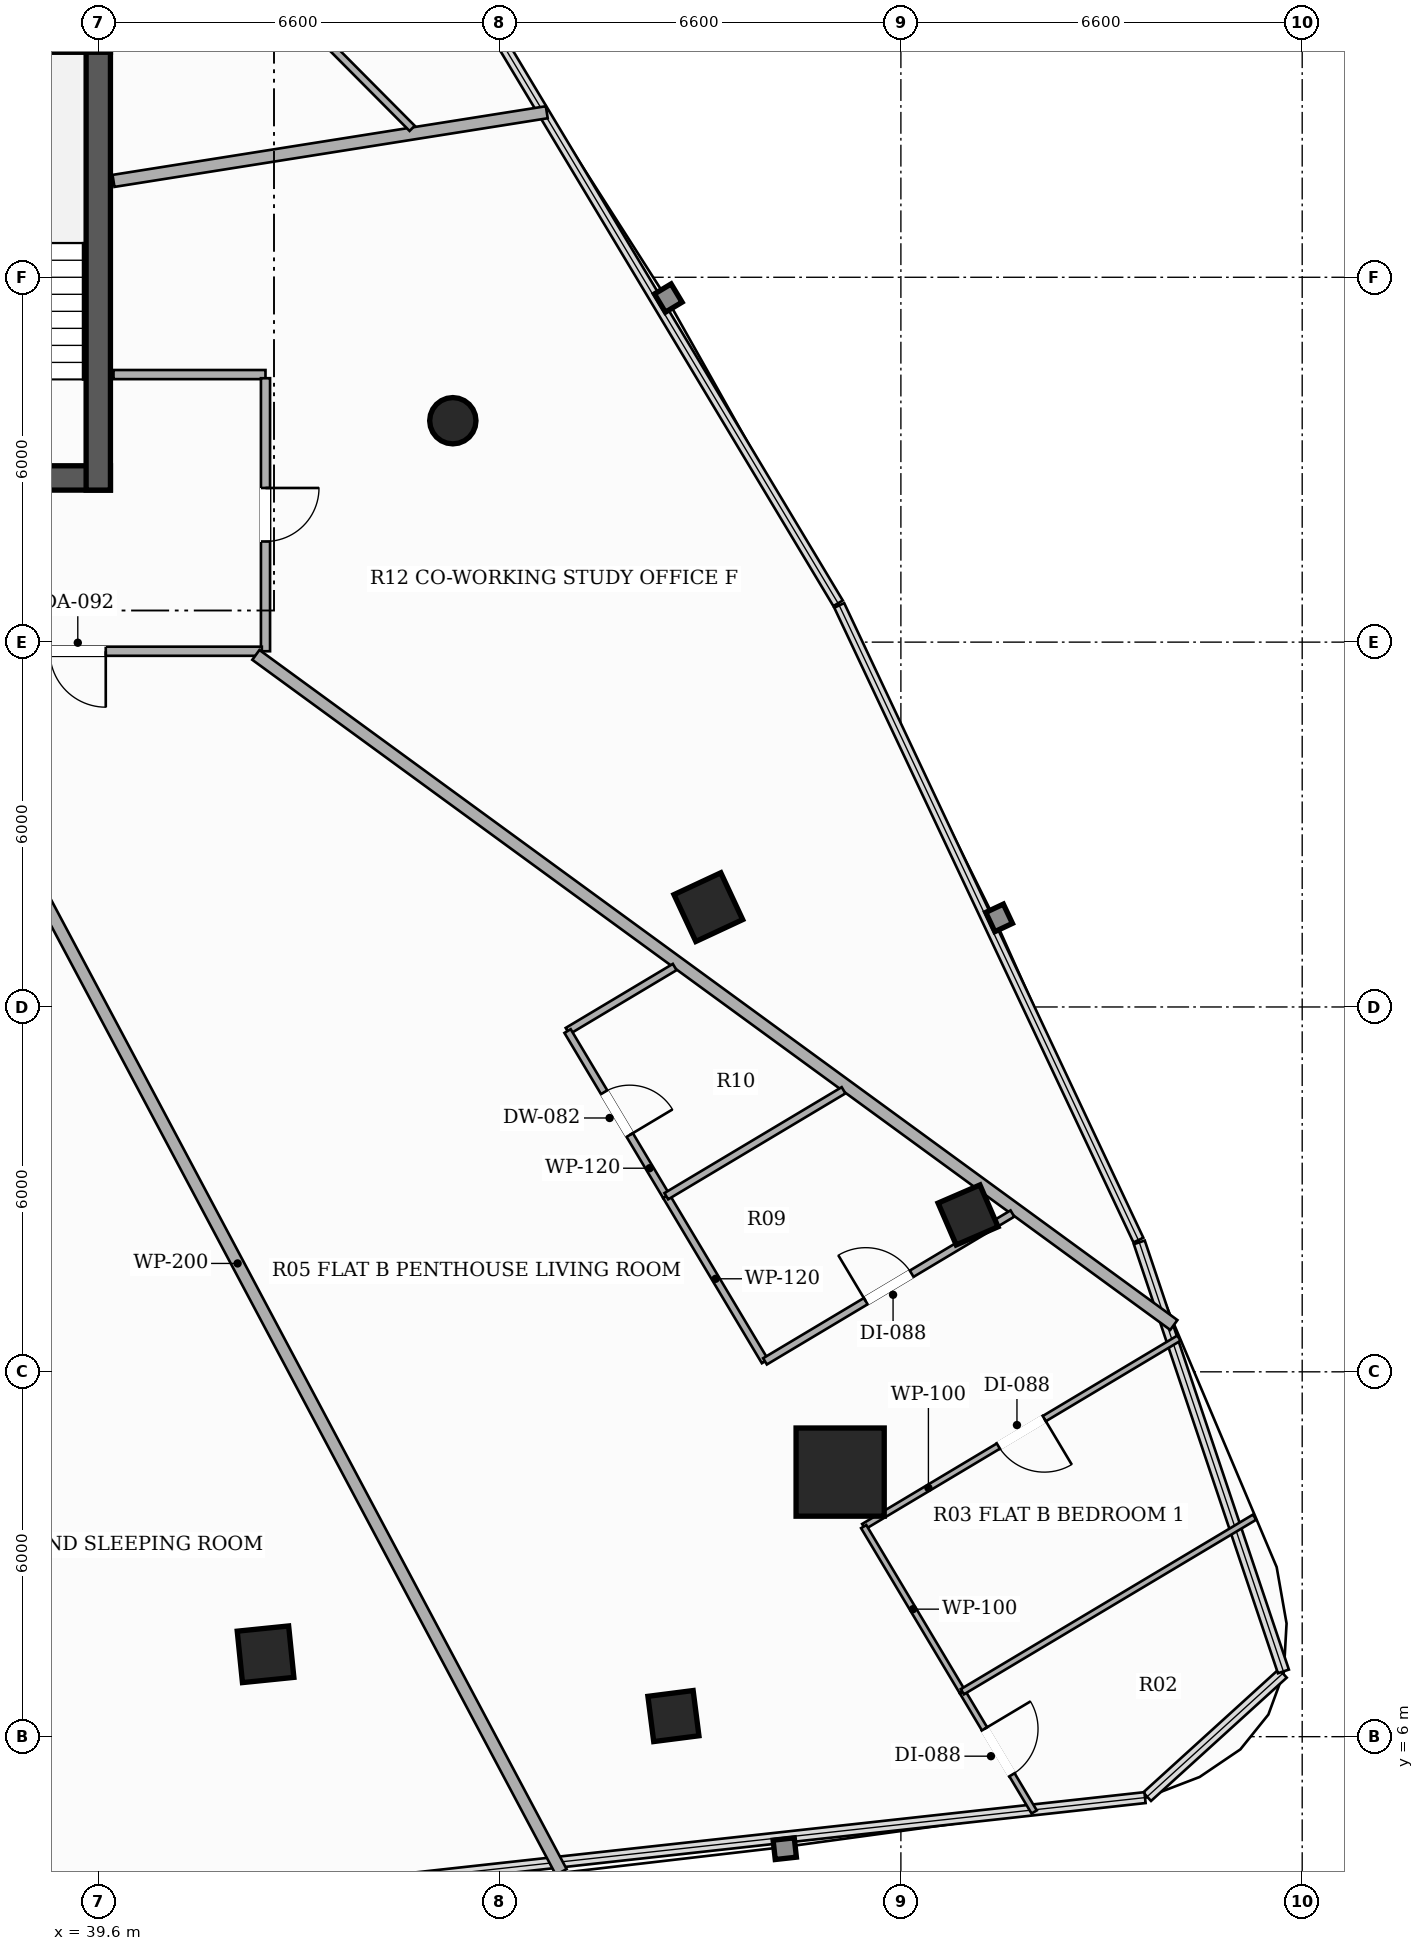
"""IFC4 building model, lengths in metres.
Left out: names, types, materials, properties, quantities, classifications, styles, units other than length and angle.
Written with IfcOpenShell. Run it as: python <this file> out.ifc"""

import sys

from ifc_helpers import new_model, si_unit, direction, frame, frame_2d, origin, origin_2d, place, context, subcontext, project, spatial, rectangle, hollow_rectangle, hollow_circle, extrude, element, fill, save


model = new_model("IFC4")
c1 = context("Model", 3, precision=1e-05, world=origin(), true_north=direction((0.0, 1.0)))
c2 = subcontext(c1, "Body", "Model", "MODEL_VIEW")
j1 = project(units=[si_unit("LENGTHUNIT", "METRE"), si_unit("PLANEANGLEUNIT", "RADIAN")], contexts=[c1])
p1 = place(None, origin())
s1 = spatial("IfcSite", under=j1, at=p1, CompositionType="ELEMENT")
p2 = place(p1, origin())
s2 = spatial("IfcBuilding", under=s1, at=p2, CompositionType="ELEMENT")
p3 = place(p2, frame((0.0, 0.0, 123.2)))
s3 = spatial("IfcBuildingStorey", under=s2, at=p3, CompositionType="ELEMENT", Elevation=123.2)
p4 = place(p3, frame((26.2, 26.7, 0.0), z_axis=(0.0, 0.0, 1.0), x_axis=(1.0, 0.0, 0.0)))
e1 = element("IfcWall", 1, at=p4, inside=s3, PredefinedType="SHEAR", context=c2, shape_type="SweptSolid", body=[
    extrude(rectangle(XDim=13.6, YDim=0.4, at=frame_2d((6.8, 0.0))), origin(), (0.0, 0.0, 1.0), 3.3),
])
p5 = place(p4, frame((4.35, 0.0, 0.0)))
e2 = element("IfcOpeningElement", 2, at=p5, cuts=e1, PredefinedType="OPENING", context=c2, shape_type="SweptSolid", body=[
    extrude(rectangle(XDim=1.05, YDim=2.15, at=frame_2d((0.525, 1.075))), frame((0.0, 0.21, 0.0), z_axis=(0.0, -1.0, 0.0), x_axis=(1.0, 0.0, 0.0)), (0.0, 0.0, 1.0), 0.42),
])
p6 = place(p4, frame((8.3, 0.0, 0.0)))
e3 = element("IfcOpeningElement", 3, at=p6, cuts=e1, PredefinedType="OPENING", context=c2, shape_type="SweptSolid", body=[
    extrude(rectangle(XDim=1.05, YDim=2.15, at=frame_2d((0.525, 1.075))), frame((0.0, 0.21, 0.0), z_axis=(0.0, -1.0, 0.0), x_axis=(1.0, 0.0, 0.0)), (0.0, 0.0, 1.0), 0.42),
])
p7 = place(p3, frame((39.6, 26.5, 0.0), z_axis=(0.0, 0.0, 1.0), x_axis=(0.0, 1.0, 0.0)))
e4 = element("IfcWall", 4, at=p7, inside=s3, PredefinedType="SHEAR", context=c2, shape_type="SweptSolid", body=[
    extrude(rectangle(XDim=7.6, YDim=0.4, at=frame_2d((3.8, 0.0))), origin(), (0.0, 0.0, 1.0), 3.3),
])
p8 = place(p3, frame((36.12, 33.9, 0.0), z_axis=(0.0, 0.0, 1.0), x_axis=(1.0, 0.0, 0.0)))
e5 = element("IfcWall", 5, at=p8, inside=s3, PredefinedType="SHEAR", context=c2, shape_type="SweptSolid", body=[
    extrude(rectangle(XDim=3.68, YDim=0.4, at=frame_2d((1.84, 0.0))), origin(), (0.0, 0.0, 1.0), 3.3),
])
p9 = place(p3, frame((51.801, 10.351, 0.0), z_axis=(0.0, 0.0, 1.0), x_axis=(1.0, 0.0, 0.0)))
e6 = element("IfcColumn", 6, at=p9, inside=s3, PredefinedType="COLUMN", context=c2, shape_type="SweptSolid", body=[
    extrude(hollow_rectangle(XDim=1.45, YDim=1.45, WallThickness=0.045, at=origin_2d()), origin(), (0.0, 0.0, 1.0), 3.3),
])
for number, where, z_axis, x_axis in (
    (7, (42.351, 7.355, 0.0), (0.0, 0.0, 1.0), (0.995, 0.101, 0.0)),
    (8, (49.633, 19.642, 0.0), (0.0, 0.0, 1.0), (-0.423, 0.906, 0.0)),
):
    element("IfcColumn", number, at=place(p3, frame(where, z_axis=z_axis, x_axis=x_axis)), inside=s3, PredefinedType="COLUMN", context=c2, shape_type="SweptSolid", body=[
        extrude(hollow_rectangle(XDim=0.85, YDim=0.85, WallThickness=0.028, at=origin_2d()), origin(), (0.0, 0.0, 1.0), 3.3),
    ])
p10 = place(p3, frame((45.431, 27.641, 0.0), z_axis=(0.0, 0.0, 1.0), x_axis=(1.0, 0.0, 0.0)))
e9 = element("IfcColumn", 9, at=p10, inside=s3, PredefinedType="COLUMN", context=c2, shape_type="SweptSolid", body=[
    extrude(hollow_circle(Radius=0.381, WallThickness=0.022, at=origin_2d()), origin(), (0.0, 0.0, 1.0), 3.3),
])
for number, where, z_axis, x_axis in (
    (10, (49.059, 6.339, 0.0), (0.0, 0.0, 1.0), (0.992, 0.127, 0.0)),
    (11, (53.905, 14.58, 0.0), (0.0, 0.0, 1.0), (-0.397, 0.918, 0.0)),
):
    element("IfcColumn", number, at=place(p3, frame(where, z_axis=z_axis, x_axis=x_axis)), inside=s3, PredefinedType="COLUMN", context=c2, shape_type="SweptSolid", body=[
        extrude(hollow_rectangle(XDim=0.75, YDim=0.75, WallThickness=0.025, at=origin_2d()), origin(), (0.0, 0.0, 1.0), 3.3),
    ])
p11 = place(p3, frame((39.85, 28.4, 0.0), z_axis=(0.0, 0.0, 1.0), x_axis=(1.0, 0.0, 0.0)))
e12 = element("IfcWall", 12, at=p11, inside=s3, PredefinedType="PARTITIONING", context=c2, shape_type="SweptSolid", body=[
    extrude(rectangle(XDim=2.5, YDim=0.15, at=frame_2d((1.25, 0.0))), origin(), (0.0, 0.0, 1.0), 2.721),
])
p12 = place(p3, frame((42.35, 28.34, 0.0), z_axis=(0.0, 0.0, 1.0), x_axis=(0.0, -1.0, 0.0)))
e13 = element("IfcWall", 13, at=p12, inside=s3, PredefinedType="PARTITIONING", context=c2, shape_type="SweptSolid", body=[
    extrude(rectangle(XDim=4.49, YDim=0.15, at=frame_2d((2.245, 0.0))), origin(), (0.0, 0.0, 1.0), 2.721),
])
p13 = place(p12, frame((1.805, 0.0, 0.0)))
e14 = element("IfcOpeningElement", 14, at=p13, cuts=e13, PredefinedType="OPENING", context=c2, shape_type="SweptSolid", body=[
    extrude(rectangle(XDim=0.88, YDim=2.1, at=frame_2d((0.44, 1.05))), frame((0.0, 0.085, 0.0), z_axis=(0.0, -1.0, 0.0), x_axis=(1.0, 0.0, 0.0)), (0.0, 0.0, 1.0), 0.17),
])
p14 = place(p3, frame((42.29, 23.85, 0.0), z_axis=(0.0, 0.0, 1.0), x_axis=(-1.0, 0.0, 0.0)))
e15 = element("IfcWall", 15, at=p14, inside=s3, PredefinedType="PARTITIONING", context=c2, shape_type="SweptSolid", body=[
    extrude(rectangle(XDim=8.088, YDim=0.15, at=frame_2d((4.044, 0.0))), origin(), (0.0, 0.0, 1.0), 2.492),
])
p15 = place(p14, frame((2.567, 0.0, 0.0)))
e16 = element("IfcOpeningElement", 16, at=p15, cuts=e15, PredefinedType="OPENING", context=c2, shape_type="SweptSolid", body=[
    extrude(rectangle(XDim=0.92, YDim=2.15, at=frame_2d((0.46, 1.075))), frame((0.0, 0.085, 0.0), z_axis=(0.0, -1.0, 0.0), x_axis=(1.0, 0.0, 0.0)), (0.0, 0.0, 1.0), 0.17),
])
p16 = place(p14, frame((6.296, 0.0, 0.0)))
e17 = element("IfcOpeningElement", 17, at=p16, cuts=e15, PredefinedType="OPENING", context=c2, shape_type="SweptSolid", body=[
    extrude(rectangle(XDim=0.92, YDim=2.15, at=frame_2d((0.46, 1.075))), frame((0.0, 0.085, 0.0), z_axis=(0.0, -1.0, 0.0), x_axis=(1.0, 0.0, 0.0)), (0.0, 0.0, 1.0), 0.17),
])
p17 = place(p3, frame((47.214, 3.775, 0.0), z_axis=(0.0, 0.0, 1.0), x_axis=(-0.469567249912, 0.88289670846, 0.0)))
e18 = element("IfcWall", 18, at=p17, inside=s3, PredefinedType="PARTITIONING", context=c2, shape_type="SweptSolid", body=[
    extrude(rectangle(XDim=22.67, YDim=0.2, at=frame_2d((11.335, 0.0))), origin(), (0.0, 0.0, 1.0), 2.413),
])
p18 = place(p3, frame((42.192, 23.79, 0.0), z_axis=(0.0, 0.0, 1.0), x_axis=(0.807710254014, -0.589579634621, 0.0)))
e19 = element("IfcWall", 19, at=p18, inside=s3, PredefinedType="PARTITIONING", context=c2, shape_type="SweptSolid", body=[
    extrude(rectangle(XDim=18.691, YDim=0.2, at=frame_2d((9.346, 0.0))), origin(), (0.0, 0.0, 1.0), 2.413),
])
p19 = place(p3, frame((46.976, 32.714, 0.0), z_axis=(0.0, 0.0, 1.0), x_axis=(-0.987677489662, -0.156502959767, 0.0)))
e20 = element("IfcWall", 20, at=p19, inside=s3, PredefinedType="PARTITIONING", context=c2, shape_type="SweptSolid", body=[
    extrude(rectangle(XDim=7.215, YDim=0.2, at=frame_2d((3.607, 0.0))), origin(), (0.0, 0.0, 1.0), 2.413),
])
p20 = place(p3, frame((49.08, 18.657, 0.0), z_axis=(0.0, 0.0, 1.0), x_axis=(-0.858394155401, -0.51299071529, 0.0)))
e21 = element("IfcWall", 21, at=p20, inside=s3, PredefinedType="PARTITIONING", context=c2, shape_type="SweptSolid", body=[
    extrude(rectangle(XDim=2.053, YDim=0.12, at=frame_2d((1.026, 0.0))), origin(), (0.0, 0.0, 1.0), 2.721),
])
p21 = place(p3, frame((47.318, 17.604, 0.0), z_axis=(0.0, 0.0, 1.0), x_axis=(0.51313361254, -0.858308741469, 0.0)))
e22 = element("IfcWall", 22, at=p21, inside=s3, PredefinedType="PARTITIONING", context=c2, shape_type="SweptSolid", body=[
    extrude(rectangle(XDim=3.165, YDim=0.12, at=frame_2d((1.582, 0.0))), origin(), (0.0, 0.0, 1.0), 2.492),
])
p22 = place(p21, frame((1.172, 0.0, 0.0)))
e23 = element("IfcOpeningElement", 23, at=p22, cuts=e22, PredefinedType="OPENING", context=c2, shape_type="SweptSolid", body=[
    extrude(rectangle(XDim=0.82, YDim=2.1, at=frame_2d((0.41, 1.05))), frame((0.0, 0.07, 0.0), z_axis=(0.0, -1.0, 0.0), x_axis=(1.0, 0.0, 0.0)), (0.0, 0.0, 1.0), 0.14),
])
p23 = place(p3, frame((48.942, 14.888, 0.0), z_axis=(0.0, 0.0, 1.0), x_axis=(0.512997049548, -0.858390369911, 0.0)))
e24 = element("IfcWall", 24, at=p23, inside=s3, PredefinedType="PARTITIONING", context=c2, shape_type="SweptSolid", body=[
    extrude(rectangle(XDim=3.164, YDim=0.12, at=frame_2d((1.582, 0.0))), origin(), (0.0, 0.0, 1.0), 2.492),
])
p24 = place(p3, frame((50.565, 12.172, 0.0), z_axis=(0.0, 0.0, 1.0), x_axis=(0.858473034369, 0.512858703018, 0.0)))
e25 = element("IfcWall", 25, at=p24, inside=s3, PredefinedType="PARTITIONING", context=c2, shape_type="SweptSolid", body=[
    extrude(rectangle(XDim=4.74, YDim=0.12, at=frame_2d((2.37, 0.0))), origin(), (0.0, 0.0, 1.0), 2.413),
])
p25 = place(p24, frame((1.93, 0.0, 0.0)))
e26 = element("IfcOpeningElement", 26, at=p25, cuts=e25, PredefinedType="OPENING", context=c2, shape_type="SweptSolid", body=[
    extrude(rectangle(XDim=0.88, YDim=2.1, at=frame_2d((0.44, 1.05))), frame((0.0, 0.07, 0.0), z_axis=(0.0, -1.0, 0.0), x_axis=(1.0, 0.0, 0.0)), (0.0, 0.0, 1.0), 0.14),
])
p26 = place(p3, frame((57.373, 12.554, 0.0), z_axis=(0.0, 0.0, 1.0), x_axis=(-0.858379637305, -0.513015007831, 0.0)))
e27 = element("IfcWall", 27, at=p26, inside=s3, PredefinedType="PARTITIONING", context=c2, shape_type="SweptSolid", body=[
    extrude(rectangle(XDim=6.041, YDim=0.1, at=frame_2d((3.02, 0.0))), origin(), (0.0, 0.0, 1.0), 2.619),
])
p27 = place(p26, frame((2.58, 0.0, 0.0)))
e28 = element("IfcOpeningElement", 28, at=p27, cuts=e27, PredefinedType="OPENING", context=c2, shape_type="SweptSolid", body=[
    extrude(rectangle(XDim=0.88, YDim=2.1, at=frame_2d((0.44, 1.05))), frame((0.0, 0.06, 0.0), z_axis=(0.0, -1.0, 0.0), x_axis=(1.0, 0.0, 0.0)), (0.0, 0.0, 1.0), 0.12),
])
p28 = place(p3, frame((52.188, 9.455, 0.0), z_axis=(0.0, 0.0, 1.0), x_axis=(0.512963071382, -0.858410675259, 0.0)))
e29 = element("IfcWall", 29, at=p28, inside=s3, PredefinedType="PARTITIONING", context=c2, shape_type="SweptSolid", body=[
    extrude(rectangle(XDim=3.164, YDim=0.1, at=frame_2d((1.582, 0.0))), origin(), (0.0, 0.0, 1.0), 2.619),
])
p29 = place(p3, frame((53.811, 6.739, 0.0), z_axis=(0.0, 0.0, 1.0), x_axis=(0.512795384263, -0.858510858335, 0.0)))
e30 = element("IfcWall", 30, at=p29, inside=s3, PredefinedType="PARTITIONING", context=c2, shape_type="SweptSolid", body=[
    extrude(rectangle(XDim=2.303, YDim=0.1, at=frame_2d((1.151, 0.0))), origin(), (0.0, 0.0, 1.0), 3.06),
])
p30 = place(p29, frame((0.711, 0.0, 0.0)))
e31 = element("IfcOpeningElement", 31, at=p30, cuts=e30, PredefinedType="OPENING", context=c2, shape_type="SweptSolid", body=[
    extrude(rectangle(XDim=0.88, YDim=2.1, at=frame_2d((0.44, 1.05))), frame((0.0, 0.06, 0.0), z_axis=(0.0, -1.0, 0.0), x_axis=(1.0, 0.0, 0.0)), (0.0, 0.0, 1.0), 0.12),
])
p31 = place(p3, frame((51.857, 16.63, 0.0), z_axis=(0.0, 0.0, 1.0), x_axis=(-0.858411372428, -0.512961904713, 0.0)))
e32 = element("IfcWall", 32, at=p31, inside=s3, PredefinedType="PARTITIONING", context=c2, shape_type="SweptSolid", body=[
    extrude(rectangle(XDim=3.396, YDim=0.12, at=frame_2d((1.698, 0.0))), origin(), (0.0, 0.0, 1.0), 2.413),
])
p32 = place(p3, frame((58.617, 9.61, 0.0), z_axis=(0.0, 0.0, 1.0), x_axis=(-0.858472602363, -0.512859426151, 0.0)))
e33 = element("IfcWall", 33, at=p32, inside=s3, PredefinedType="PARTITIONING", context=c2, shape_type="SweptSolid", body=[
    extrude(rectangle(XDim=5.598, YDim=0.1, at=frame_2d((2.799, 0.0))), origin(), (0.0, 0.0, 1.0), 3.06),
])
p33 = place(p3, frame((39.203, 38.043, 0.0), z_axis=(0.0, 0.0, 1.0), x_axis=(0.704889894519, -0.709316739267, 0.0)))
e34 = element("IfcWall", 34, at=p33, inside=s3, PredefinedType="PARTITIONING", context=c2, shape_type="SweptSolid", body=[
    extrude(rectangle(XDim=7.886, YDim=0.12, at=frame_2d((3.943, 0.0))), origin(), (0.0, 0.0, 1.0), 2.413),
])
p34 = place(p33, frame((3.78, 0.0, 0.0)))
e35 = element("IfcOpeningElement", 35, at=p34, cuts=e34, PredefinedType="OPENING", context=c2, shape_type="SweptSolid", body=[
    extrude(rectangle(XDim=0.82, YDim=2.1, at=frame_2d((0.41, 1.05))), frame((0.0, 0.07, 0.0), z_axis=(0.0, -1.0, 0.0), x_axis=(1.0, 0.0, 0.0)), (0.0, 0.0, 1.0), 0.14),
])
p35 = place(p15, origin())
e36 = element("IfcDoor", 36, at=p35, inside=s3, OperationType="SINGLE_SWING_LEFT", PredefinedType="DOOR", context=c2, shape_type="SweptSolid", body=[
    extrude(rectangle(XDim=0.92, YDim=2.15, at=frame_2d((0.46, 1.075))), frame((0.0, 0.025, 0.0), z_axis=(0.0, -1.0, 0.0), x_axis=(1.0, 0.0, 0.0)), (0.0, 0.0, 1.0), 0.05),
])
fill(e16, e36)
p36 = place(p22, origin())
e37 = element("IfcDoor", 37, at=p36, inside=s3, OperationType="SINGLE_SWING_RIGHT", PredefinedType="DOOR", context=c2, shape_type="SweptSolid", body=[
    extrude(rectangle(XDim=0.82, YDim=2.1, at=frame_2d((0.41, 1.05))), frame((0.0, 0.025, 0.0), z_axis=(0.0, -1.0, 0.0), x_axis=(1.0, 0.0, 0.0)), (0.0, 0.0, 1.0), 0.05),
])
fill(e23, e37)
p37 = place(p25, origin())
e38 = element("IfcDoor", 38, at=p37, inside=s3, OperationType="SINGLE_SWING_LEFT", PredefinedType="DOOR", context=c2, shape_type="SweptSolid", body=[
    extrude(rectangle(XDim=0.88, YDim=2.1, at=frame_2d((0.44, 1.05))), frame((0.0, 0.025, 0.0), z_axis=(0.0, -1.0, 0.0), x_axis=(1.0, 0.0, 0.0)), (0.0, 0.0, 1.0), 0.05),
])
fill(e26, e38)
p38 = place(p27, origin())
e39 = element("IfcDoor", 39, at=p38, inside=s3, OperationType="SINGLE_SWING_LEFT", PredefinedType="DOOR", context=c2, shape_type="SweptSolid", body=[
    extrude(rectangle(XDim=0.88, YDim=2.1, at=frame_2d((0.44, 1.05))), frame((0.0, 0.025, 0.0), z_axis=(0.0, -1.0, 0.0), x_axis=(1.0, 0.0, 0.0)), (0.0, 0.0, 1.0), 0.05),
])
fill(e28, e39)
p39 = place(p30, origin())
e40 = element("IfcDoor", 40, at=p39, inside=s3, OperationType="SINGLE_SWING_LEFT", PredefinedType="DOOR", context=c2, shape_type="SweptSolid", body=[
    extrude(rectangle(XDim=0.88, YDim=2.1, at=frame_2d((0.44, 1.05))), frame((0.0, 0.025, 0.0), z_axis=(0.0, -1.0, 0.0), x_axis=(1.0, 0.0, 0.0)), (0.0, 0.0, 1.0), 0.05),
])
fill(e31, e40)
p40 = place(p13, origin())
e41 = element("IfcDoor", 41, at=p40, inside=s3, OperationType="SINGLE_SWING_LEFT", PredefinedType="DOOR", context=c2, shape_type="SweptSolid", body=[
    extrude(rectangle(XDim=0.88, YDim=2.1, at=frame_2d((0.44, 1.05))), frame((0.0, 0.025, 0.0), z_axis=(0.0, -1.0, 0.0), x_axis=(1.0, 0.0, 0.0)), (0.0, 0.0, 1.0), 0.05),
])
fill(e14, e41)
save(model, sys.argv[1])
